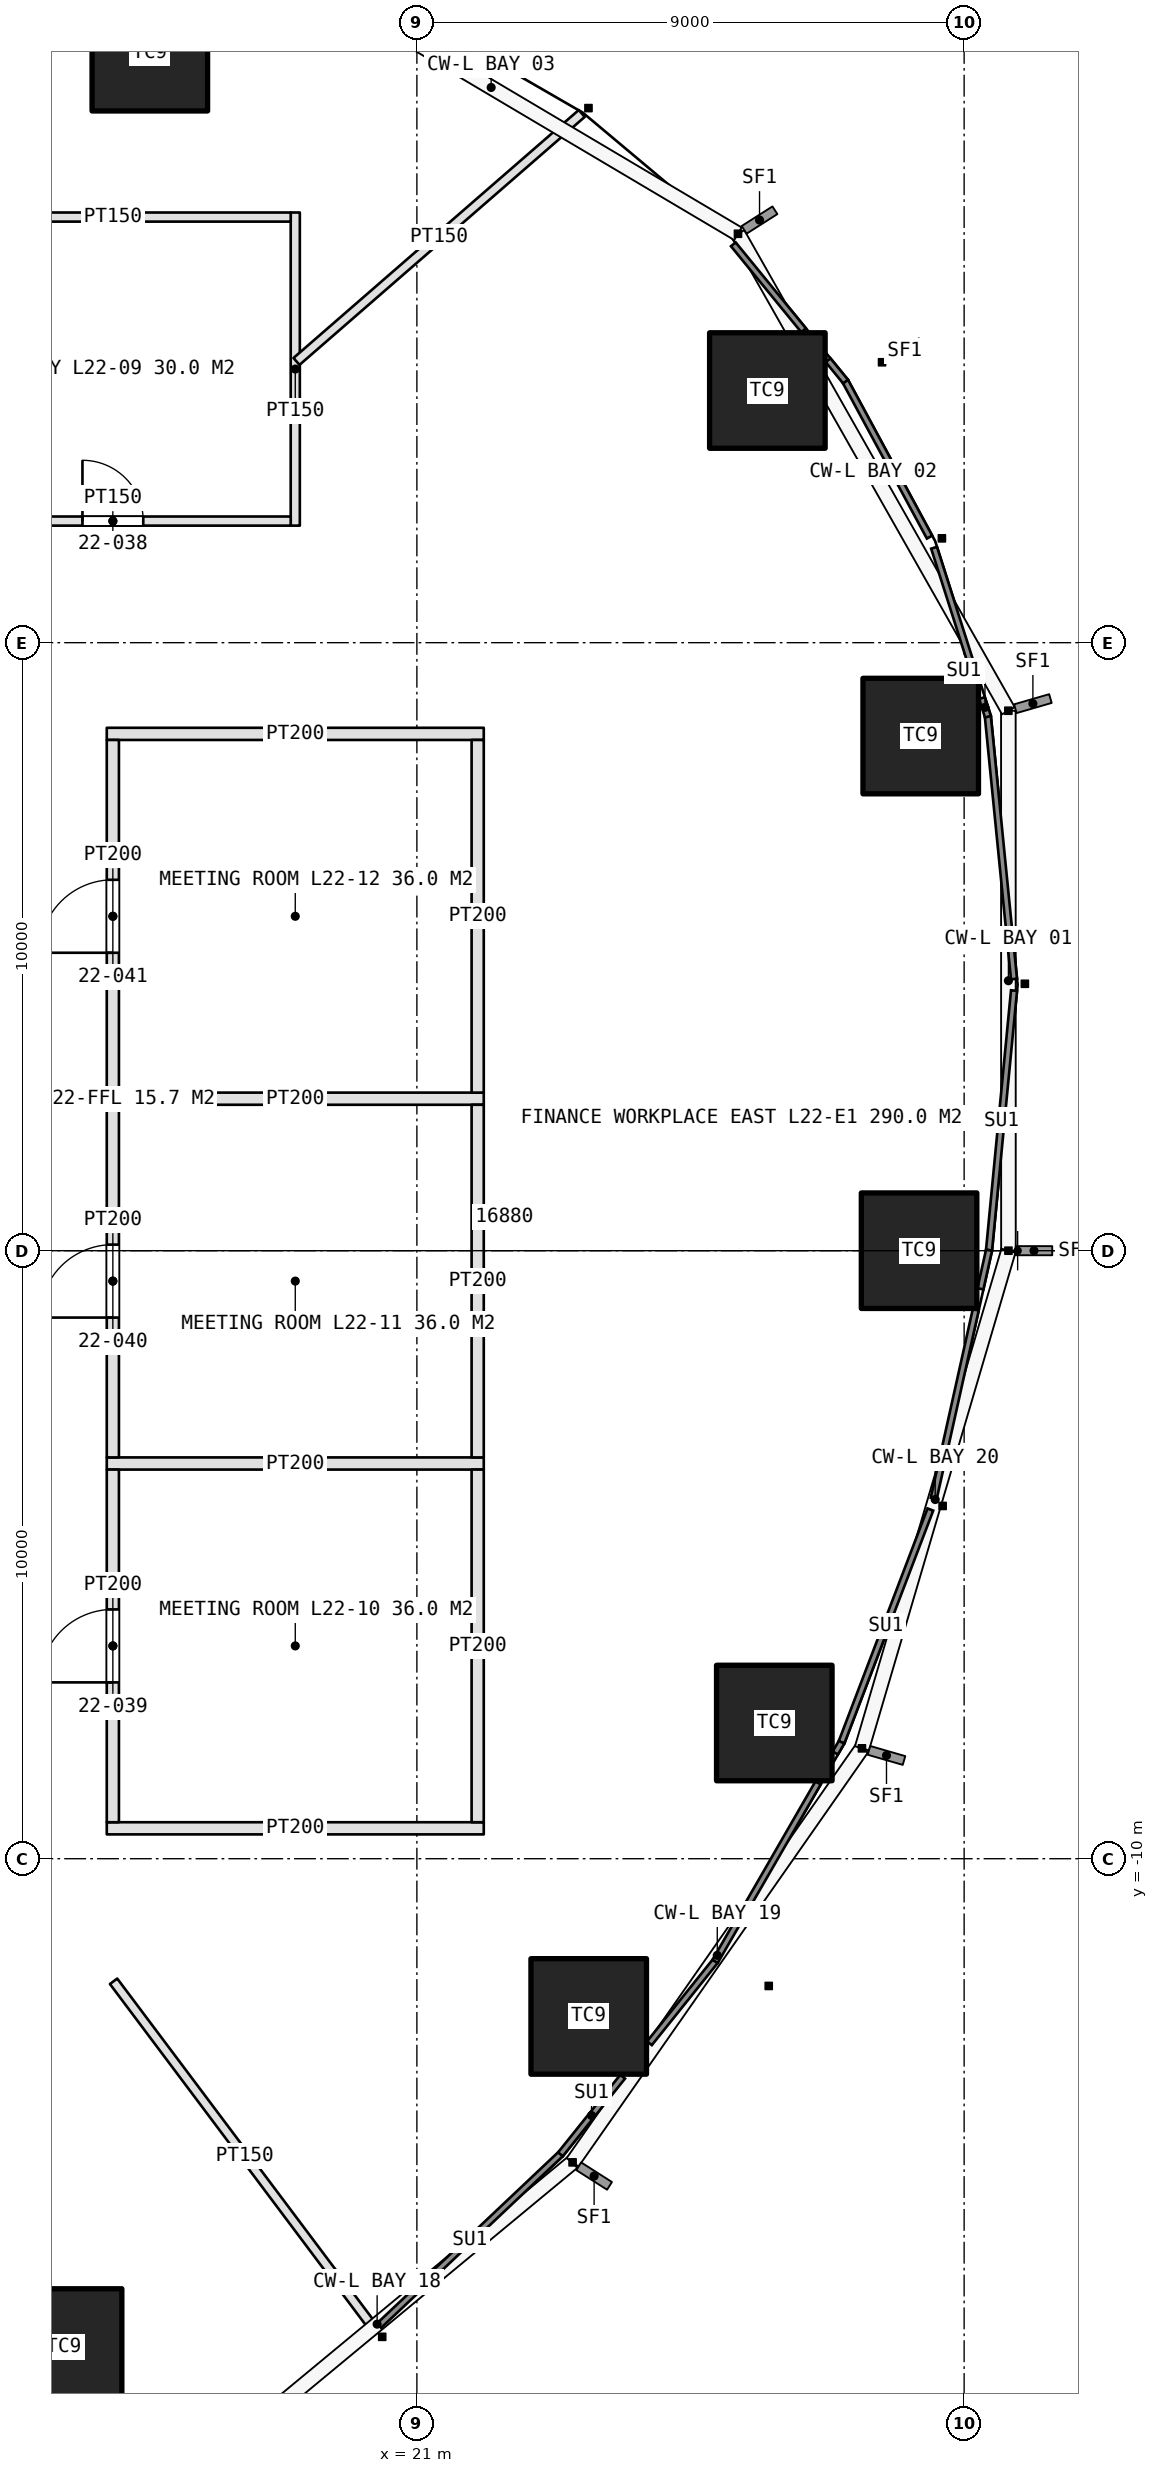
"""IFC4 building model, lengths in metres.
Left out: names, types, materials, properties, quantities, classifications, styles, units other than length and angle.
Written with IfcOpenShell. Run it as: python <this file> out.ifc"""

import sys

from ifc_helpers import new_model, si_unit, direction, frame, frame_2d, origin, origin_2d, place, context, subcontext, project, spatial, rectangle, extrude, element, fill, save


model = new_model("IFC4")
c1 = context("Model", 3, precision=1e-05, world=origin(), true_north=direction((0.0, 1.0)))
c2 = subcontext(c1, "Body", "Model", "MODEL_VIEW")
j1 = project(units=[si_unit("LENGTHUNIT", "METRE"), si_unit("PLANEANGLEUNIT", "RADIAN")], contexts=[c1])
p1 = place(None, origin())
s1 = spatial("IfcSite", under=j1, at=p1, CompositionType="ELEMENT")
p2 = place(p1, origin())
s2 = spatial("IfcBuilding", under=s1, at=p2, CompositionType="ELEMENT")
p3 = place(p2, frame((0.0, 0.0, 109.2)))
s3 = spatial("IfcBuildingStorey", under=s2, at=p3, CompositionType="ELEMENT", Elevation=109.2)
for number, where, z_axis, x_axis in (
    (1, (29.259, 0.0, 0.0), (0.0, 0.0, 1.0), (1.0, 0.0, 0.0)),
    (2, (29.286, 8.464, 0.0), (0.0, 0.0, 1.0), (1.0, 0.0, 0.0)),
    (3, (26.764, 14.147, 0.0), (0.0, 0.0, 1.0), (1.0, 0.0, 0.0)),
    (4, (16.608, 19.695, 0.0), (0.0, 0.0, 1.0), (1.0, 0.0, 0.0)),
    (5, (15.198, -18.023, 0.0), (0.0, 0.0, 1.0), (1.0, 0.0, 0.0)),
    (6, (23.826, -12.594, 0.0), (0.0, 0.0, 1.0), (1.0, 0.0, 0.0)),
    (7, (26.878, -7.768, 0.0), (0.0, 0.0, 1.0), (1.0, 0.0, 0.0)),
):
    element("IfcColumn", number, at=place(p3, frame(where, z_axis=z_axis, x_axis=x_axis)), inside=s3, PredefinedType="COLUMN", context=c2, shape_type="SweptSolid", body=[
        extrude(rectangle(XDim=1.9, YDim=1.9, at=origin_2d()), origin(), (0.0, 0.0, 1.0), 4.2),
    ])
p4 = place(p3, frame((19.0, 11.925, 0.0), z_axis=(0.0, 0.0, 1.0), x_axis=(0.0, 1.0, 0.0)))
e8 = element("IfcWall", 8, at=p4, inside=s3, PredefinedType="PARTITIONING", context=c2, shape_type="SweptSolid", body=[
    extrude(rectangle(XDim=5.15, YDim=0.15, at=frame_2d((2.575, 0.0))), origin(), (0.0, 0.0, 1.0), 3.0),
])
p5 = place(p3, frame((13.075, 12.0, 0.0), z_axis=(0.0, 0.0, 1.0), x_axis=(1.0, 0.0, 0.0)))
e9 = element("IfcWall", 9, at=p5, inside=s3, PredefinedType="PARTITIONING", context=c2, shape_type="SweptSolid", body=[
    extrude(rectangle(XDim=5.85, YDim=0.15, at=frame_2d((2.925, 0.0))), origin(), (0.0, 0.0, 1.0), 3.0),
])
p6 = place(p5, frame((2.425, 0.0, 0.0)))
e10 = element("IfcOpeningElement", 10, at=p6, cuts=e9, PredefinedType="OPENING", context=c2, shape_type="SweptSolid", body=[
    extrude(rectangle(XDim=1.0, YDim=2.2, at=frame_2d((0.5, 1.1))), frame((0.0, 0.085, 0.0), z_axis=(0.0, -1.0, 0.0), x_axis=(1.0, 0.0, 0.0)), (0.0, 0.0, 1.0), 0.17),
])
p7 = place(p3, frame((13.075, 17.0, 0.0), z_axis=(0.0, 0.0, 1.0), x_axis=(1.0, 0.0, 0.0)))
e11 = element("IfcWall", 11, at=p7, inside=s3, PredefinedType="PARTITIONING", context=c2, shape_type="SweptSolid", body=[
    extrude(rectangle(XDim=5.85, YDim=0.15, at=frame_2d((2.925, 0.0))), origin(), (0.0, 0.0, 1.0), 3.0),
])
for number, where, z_axis, x_axis in (
    (12, (15.9, -9.5, 0.0), (0.0, 0.0, 1.0), (1.0, 0.0, 0.0)),
    (13, (15.9, -3.5, 0.0), (0.0, 0.0, 1.0), (1.0, 0.0, 0.0)),
    (14, (15.9, 2.5, 0.0), (0.0, 0.0, 1.0), (1.0, 0.0, 0.0)),
    (15, (15.9, 8.5, 0.0), (0.0, 0.0, 1.0), (1.0, 0.0, 0.0)),
):
    element("IfcWall", number, at=place(p3, frame(where, z_axis=z_axis, x_axis=x_axis)), inside=s3, PredefinedType="PARTITIONING", context=c2, shape_type="SweptSolid", body=[
        extrude(rectangle(XDim=6.2, YDim=0.2, at=frame_2d((3.1, 0.0))), origin(), (0.0, 0.0, 1.0), 3.0),
    ])
p8 = place(p3, frame((16.0, -9.4, 0.0), z_axis=(0.0, 0.0, 1.0), x_axis=(0.0, 1.0, 0.0)))
e16 = element("IfcWall", 16, at=p8, inside=s3, PredefinedType="PARTITIONING", context=c2, shape_type="SweptSolid", body=[
    extrude(rectangle(XDim=5.8, YDim=0.2, at=frame_2d((2.9, 0.0))), origin(), (0.0, 0.0, 1.0), 3.0),
])
p9 = place(p8, frame((2.3, 0.0, 0.0)))
e17 = element("IfcOpeningElement", 17, at=p9, cuts=e16, PredefinedType="OPENING", context=c2, shape_type="SweptSolid", body=[
    extrude(rectangle(XDim=1.2, YDim=2.4, at=frame_2d((0.6, 1.2))), frame((0.0, 0.11, 0.0), z_axis=(0.0, -1.0, 0.0), x_axis=(1.0, 0.0, 0.0)), (0.0, 0.0, 1.0), 0.22),
])
p10 = place(p3, frame((22.0, -9.4, 0.0), z_axis=(0.0, 0.0, 1.0), x_axis=(0.0, 1.0, 0.0)))
e18 = element("IfcWall", 18, at=p10, inside=s3, PredefinedType="PARTITIONING", context=c2, shape_type="SweptSolid", body=[
    extrude(rectangle(XDim=5.8, YDim=0.2, at=frame_2d((2.9, 0.0))), origin(), (0.0, 0.0, 1.0), 3.0),
])
p11 = place(p3, frame((16.0, -3.4, 0.0), z_axis=(0.0, 0.0, 1.0), x_axis=(0.0, 1.0, 0.0)))
e19 = element("IfcWall", 19, at=p11, inside=s3, PredefinedType="PARTITIONING", context=c2, shape_type="SweptSolid", body=[
    extrude(rectangle(XDim=5.8, YDim=0.2, at=frame_2d((2.9, 0.0))), origin(), (0.0, 0.0, 1.0), 3.0),
])
p12 = place(p11, frame((2.3, 0.0, 0.0)))
e20 = element("IfcOpeningElement", 20, at=p12, cuts=e19, PredefinedType="OPENING", context=c2, shape_type="SweptSolid", body=[
    extrude(rectangle(XDim=1.2, YDim=2.4, at=frame_2d((0.6, 1.2))), frame((0.0, 0.11, 0.0), z_axis=(0.0, -1.0, 0.0), x_axis=(1.0, 0.0, 0.0)), (0.0, 0.0, 1.0), 0.22),
])
p13 = place(p3, frame((22.0, -3.4, 0.0), z_axis=(0.0, 0.0, 1.0), x_axis=(0.0, 1.0, 0.0)))
e21 = element("IfcWall", 21, at=p13, inside=s3, PredefinedType="PARTITIONING", context=c2, shape_type="SweptSolid", body=[
    extrude(rectangle(XDim=5.8, YDim=0.2, at=frame_2d((2.9, 0.0))), origin(), (0.0, 0.0, 1.0), 3.0),
])
p14 = place(p3, frame((16.0, 2.6, 0.0), z_axis=(0.0, 0.0, 1.0), x_axis=(0.0, 1.0, 0.0)))
e22 = element("IfcWall", 22, at=p14, inside=s3, PredefinedType="PARTITIONING", context=c2, shape_type="SweptSolid", body=[
    extrude(rectangle(XDim=5.8, YDim=0.2, at=frame_2d((2.9, 0.0))), origin(), (0.0, 0.0, 1.0), 3.0),
])
p15 = place(p14, frame((2.3, 0.0, 0.0)))
e23 = element("IfcOpeningElement", 23, at=p15, cuts=e22, PredefinedType="OPENING", context=c2, shape_type="SweptSolid", body=[
    extrude(rectangle(XDim=1.2, YDim=2.4, at=frame_2d((0.6, 1.2))), frame((0.0, 0.11, 0.0), z_axis=(0.0, -1.0, 0.0), x_axis=(1.0, 0.0, 0.0)), (0.0, 0.0, 1.0), 0.22),
])
p16 = place(p3, frame((22.0, 2.6, 0.0), z_axis=(0.0, 0.0, 1.0), x_axis=(0.0, 1.0, 0.0)))
e24 = element("IfcWall", 24, at=p16, inside=s3, PredefinedType="PARTITIONING", context=c2, shape_type="SweptSolid", body=[
    extrude(rectangle(XDim=5.8, YDim=0.2, at=frame_2d((2.9, 0.0))), origin(), (0.0, 0.0, 1.0), 3.0),
])
p17 = place(p3, frame((16.012, -12.016, 0.0), z_axis=(0.0, 0.0, 1.0), x_axis=(0.600059749679, -0.799955184254, 0.0)))
e25 = element("IfcWall", 25, at=p17, inside=s3, PredefinedType="PARTITIONING", context=c2, shape_type="SweptSolid", body=[
    extrude(rectangle(XDim=7.191, YDim=0.15, at=frame_2d((3.596, 0.0))), origin(), (0.0, 0.0, 1.0), 3.0),
])
p18 = place(p3, frame((19.02, 14.625, 0.0), z_axis=(0.0, 0.0, 1.0), x_axis=(0.754691753605, 0.656079535605, 0.0)))
e26 = element("IfcWall", 26, at=p18, inside=s3, PredefinedType="PARTITIONING", context=c2, shape_type="SweptSolid", body=[
    extrude(rectangle(XDim=6.217, YDim=0.15, at=frame_2d((3.108, 0.0))), origin(), (0.0, 0.0, 1.0), 3.0),
])
p19 = place(p6, origin())
e27 = element("IfcDoor", 27, at=p19, inside=s3, OperationType="SINGLE_SWING_LEFT", PredefinedType="DOOR", context=c2, shape_type="SweptSolid", body=[
    extrude(rectangle(XDim=1.0, YDim=2.2, at=frame_2d((0.5, 1.1))), frame((0.0, 0.025, 0.0), z_axis=(0.0, -1.0, 0.0), x_axis=(1.0, 0.0, 0.0)), (0.0, 0.0, 1.0), 0.05),
])
fill(e10, e27)
p20 = place(p9, origin())
e28 = element("IfcDoor", 28, at=p20, inside=s3, OperationType="SINGLE_SWING_LEFT", PredefinedType="DOOR", context=c2, shape_type="SweptSolid", body=[
    extrude(rectangle(XDim=1.2, YDim=2.4, at=frame_2d((0.6, 1.2))), frame((0.0, 0.025, 0.0), z_axis=(0.0, -1.0, 0.0), x_axis=(1.0, 0.0, 0.0)), (0.0, 0.0, 1.0), 0.05),
])
fill(e17, e28)
p21 = place(p12, origin())
e29 = element("IfcDoor", 29, at=p21, inside=s3, OperationType="SINGLE_SWING_LEFT", PredefinedType="DOOR", context=c2, shape_type="SweptSolid", body=[
    extrude(rectangle(XDim=1.2, YDim=2.4, at=frame_2d((0.6, 1.2))), frame((0.0, 0.025, 0.0), z_axis=(0.0, -1.0, 0.0), x_axis=(1.0, 0.0, 0.0)), (0.0, 0.0, 1.0), 0.05),
])
fill(e20, e29)
p22 = place(p15, origin())
e30 = element("IfcDoor", 30, at=p22, inside=s3, OperationType="SINGLE_SWING_LEFT", PredefinedType="DOOR", context=c2, shape_type="SweptSolid", body=[
    extrude(rectangle(XDim=1.2, YDim=2.4, at=frame_2d((0.6, 1.2))), frame((0.0, 0.025, 0.0), z_axis=(0.0, -1.0, 0.0), x_axis=(1.0, 0.0, 0.0)), (0.0, 0.0, 1.0), 0.05),
])
fill(e23, e30)
save(model, sys.argv[1])
